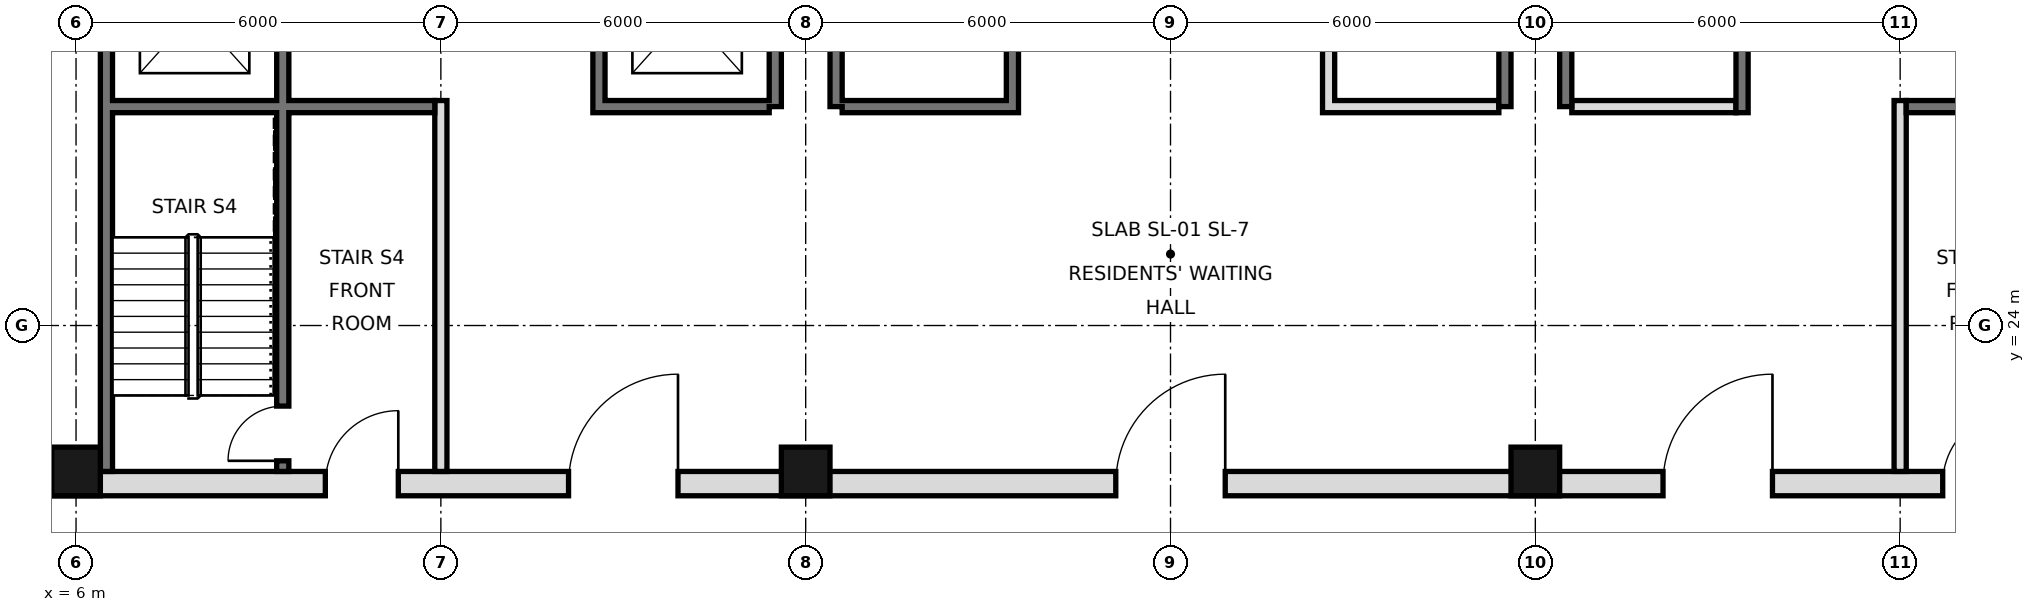
"""IFC4 building model, lengths in metres.
Left out: names, types, materials, properties, quantities, classifications, styles, units other than length and angle.
Written with IfcOpenShell. Run it as: python <this file> out.ifc"""

import sys

from ifc_helpers import new_model, si_unit, direction, frame, frame_2d, origin, origin_2d, place, context, subcontext, project, spatial, rectangle, hollow_rectangle, extrude, element, fill, save


model = new_model("IFC4")
c1 = context("Model", 3, precision=1e-05, world=origin(), true_north=direction((0.0, 1.0)))
c2 = subcontext(c1, "Body", "Model", "MODEL_VIEW")
j1 = project(units=[si_unit("LENGTHUNIT", "METRE"), si_unit("PLANEANGLEUNIT", "RADIAN")], contexts=[c1])
p1 = place(None, origin())
s1 = spatial("IfcSite", under=j1, at=p1, CompositionType="ELEMENT")
p2 = place(p1, origin())
s2 = spatial("IfcBuilding", under=s1, at=p2, CompositionType="ELEMENT")
p3 = place(p2, frame((0.0, 0.0, 75.0)))
s3 = spatial("IfcBuildingStorey", under=s2, at=p3, CompositionType="ELEMENT", Elevation=75.0)
for number, where, z_axis, x_axis in (
    (1, (6.0, 21.6, 0.0), (0.0, 0.0, 1.0), (1.0, 0.0, 0.0)),
    (2, (18.0, 21.6, 0.0), (0.0, 0.0, 1.0), (1.0, 0.0, 0.0)),
    (3, (30.0, 21.6, 0.0), (0.0, 0.0, 1.0), (1.0, 0.0, 0.0)),
):
    element("IfcColumn", number, at=place(p3, frame(where, z_axis=z_axis, x_axis=x_axis)), inside=s3, PredefinedType="COLUMN", context=c2, shape_type="SweptSolid", body=[
        extrude(hollow_rectangle(XDim=0.8, YDim=0.8, WallThickness=0.06, at=origin_2d()), origin(), (0.0, 0.0, 1.0), 3.6),
    ])
p4 = place(p3, frame((6.5, 21.6, 0.0), z_axis=(0.0, 0.0, 1.0), x_axis=(0.0, 1.0, 0.0)))
e4 = element("IfcWall", 4, at=p4, inside=s3, PredefinedType="SOLIDWALL", context=c2, shape_type="SweptSolid", body=[
    extrude(rectangle(XDim=23.5, YDim=0.2, at=frame_2d((11.75, 0.0))), origin(), (0.0, 0.0, 1.0), 3.42),
])
for number, where, z_axis, x_axis in (
    (5, (17.5, 27.6, 0.0), (0.0, 0.0, 1.0), (0.0, 1.0, 0.0)),
    (6, (18.5, 27.6, 0.0), (0.0, 0.0, 1.0), (0.0, 1.0, 0.0)),
    (7, (29.5, 27.6, 0.0), (0.0, 0.0, 1.0), (0.0, 1.0, 0.0)),
    (8, (30.5, 27.6, 0.0), (0.0, 0.0, 1.0), (0.0, 1.0, 0.0)),
):
    element("IfcWall", number, at=place(p3, frame(where, z_axis=z_axis, x_axis=x_axis)), inside=s3, PredefinedType="SOLIDWALL", context=c2, shape_type="SweptSolid", body=[
        extrude(rectangle(XDim=17.5, YDim=0.2, at=frame_2d((8.75, 0.0))), origin(), (0.0, 0.0, 1.0), 3.42),
    ])
p5 = place(p3, frame((5.6, 21.4, 0.0), z_axis=(0.0, 0.0, 1.0), x_axis=(1.0, 0.0, 0.0)))
e9 = element("IfcWall", 9, at=p5, inside=s3, PredefinedType="SOLIDWALL", context=c2, shape_type="SweptSolid", body=[
    extrude(rectangle(XDim=36.8, YDim=0.4, at=frame_2d((18.4, 0.0))), origin(), (0.0, 0.0, 1.0), 3.42),
])
p6 = place(p5, frame((8.5, 0.0, 0.0)))
e10 = element("IfcOpeningElement", 10, at=p6, cuts=e9, PredefinedType="OPENING", context=c2, shape_type="SweptSolid", body=[
    extrude(rectangle(XDim=1.8, YDim=2.1, at=frame_2d((0.9, 1.05))), frame((0.0, 0.21, 0.0), z_axis=(0.0, -1.0, 0.0), x_axis=(1.0, 0.0, 0.0)), (0.0, 0.0, 1.0), 0.42),
])
p7 = place(p5, frame((17.5, 0.0, 0.0)))
e11 = element("IfcOpeningElement", 11, at=p7, cuts=e9, PredefinedType="OPENING", context=c2, shape_type="SweptSolid", body=[
    extrude(rectangle(XDim=1.8, YDim=2.1, at=frame_2d((0.9, 1.05))), frame((0.0, 0.21, 0.0), z_axis=(0.0, -1.0, 0.0), x_axis=(1.0, 0.0, 0.0)), (0.0, 0.0, 1.0), 0.42),
])
p8 = place(p5, frame((26.5, 0.0, 0.0)))
e12 = element("IfcOpeningElement", 12, at=p8, cuts=e9, PredefinedType="OPENING", context=c2, shape_type="SweptSolid", body=[
    extrude(rectangle(XDim=1.8, YDim=2.1, at=frame_2d((0.9, 1.05))), frame((0.0, 0.21, 0.0), z_axis=(0.0, -1.0, 0.0), x_axis=(1.0, 0.0, 0.0)), (0.0, 0.0, 1.0), 0.42),
])
p9 = place(p5, frame((4.5, 0.0, 0.0)))
e13 = element("IfcOpeningElement", 13, at=p9, cuts=e9, PredefinedType="OPENING", context=c2, shape_type="SweptSolid", body=[
    extrude(rectangle(XDim=1.2, YDim=2.1, at=frame_2d((0.6, 1.05))), frame((0.0, 0.21, 0.0), z_axis=(0.0, -1.0, 0.0), x_axis=(1.0, 0.0, 0.0)), (0.0, 0.0, 1.0), 0.42),
])
p10 = place(p5, frame((31.1, 0.0, 0.0)))
e14 = element("IfcOpeningElement", 14, at=p10, cuts=e9, PredefinedType="OPENING", context=c2, shape_type="SweptSolid", body=[
    extrude(rectangle(XDim=1.2, YDim=2.1, at=frame_2d((0.6, 1.05))), frame((0.0, 0.21, 0.0), z_axis=(0.0, -1.0, 0.0), x_axis=(1.0, 0.0, 0.0)), (0.0, 0.0, 1.0), 0.42),
])
p11 = place(p3, frame((12.0, 21.6, 0.0), z_axis=(0.0, 0.0, 1.0), x_axis=(0.0, 1.0, 0.0)))
e15 = element("IfcWall", 15, at=p11, inside=s3, PredefinedType="PARTITIONING", context=c2, shape_type="SweptSolid", body=[
    extrude(rectangle(XDim=6.1, YDim=0.2, at=frame_2d((3.05, 0.0))), origin(), (0.0, 0.0, 1.0), 3.42),
])
p12 = place(p3, frame((14.6, 27.5, 0.0), z_axis=(0.0, 0.0, 1.0), x_axis=(0.0, 1.0, 0.0)))
e16 = element("IfcWall", 16, at=p12, inside=s3, PredefinedType="SOLIDWALL", context=c2, shape_type="SweptSolid", body=[
    extrude(rectangle(XDim=17.5, YDim=0.2, at=frame_2d((8.75, 0.0))), origin(), (0.0, 0.0, 1.0), 3.42),
])
p13 = place(p12, frame((1.1, 0.0, 0.0)))
e17 = element("IfcOpeningElement", 17, at=p13, cuts=e16, PredefinedType="OPENING", context=c2, shape_type="SweptSolid", body=[
    extrude(rectangle(XDim=1.1, YDim=2.1, at=frame_2d((0.55, 1.05))), frame((0.0, 0.11, 0.0), z_axis=(0.0, -1.0, 0.0), x_axis=(1.0, 0.0, 0.0)), (0.0, 0.0, 1.0), 0.22),
])
p14 = place(p12, frame((4.2, 0.0, 0.0)))
e18 = element("IfcOpeningElement", 18, at=p14, cuts=e16, PredefinedType="OPENING", context=c2, shape_type="SweptSolid", body=[
    extrude(rectangle(XDim=1.1, YDim=2.1, at=frame_2d((0.55, 1.05))), frame((0.0, 0.11, 0.0), z_axis=(0.0, -1.0, 0.0), x_axis=(1.0, 0.0, 0.0)), (0.0, 0.0, 1.0), 0.22),
])
p15 = place(p12, frame((15.4, 0.0, 0.0)))
e19 = element("IfcOpeningElement", 19, at=p15, cuts=e16, PredefinedType="OPENING", context=c2, shape_type="SweptSolid", body=[
    extrude(rectangle(XDim=1.1, YDim=2.1, at=frame_2d((0.55, 1.05))), frame((0.0, 0.11, 0.0), z_axis=(0.0, -1.0, 0.0), x_axis=(1.0, 0.0, 0.0)), (0.0, 0.0, 1.0), 0.22),
])
p16 = place(p12, frame((9.9, 0.0, 0.0)))
e20 = element("IfcOpeningElement", 20, at=p16, cuts=e16, PredefinedType="OPENING", context=c2, shape_type="SweptSolid", body=[
    extrude(rectangle(XDim=0.9, YDim=2.1, at=frame_2d((0.45, 1.05))), frame((0.0, 0.11, 0.0), z_axis=(0.0, -1.0, 0.0), x_axis=(1.0, 0.0, 0.0)), (0.0, 0.0, 1.0), 0.22),
])
p17 = place(p3, frame((21.4, 27.5, 0.0), z_axis=(0.0, 0.0, 1.0), x_axis=(0.0, 1.0, 0.0)))
e21 = element("IfcWall", 21, at=p17, inside=s3, PredefinedType="SOLIDWALL", context=c2, shape_type="SweptSolid", body=[
    extrude(rectangle(XDim=17.5, YDim=0.2, at=frame_2d((8.75, 0.0))), origin(), (0.0, 0.0, 1.0), 3.42),
])
p18 = place(p17, frame((9.8, 0.0, 0.0)))
e22 = element("IfcOpeningElement", 22, at=p18, cuts=e21, PredefinedType="OPENING", context=c2, shape_type="SweptSolid", body=[
    extrude(rectangle(XDim=1.0, YDim=2.1, at=frame_2d((0.5, 1.05))), frame((0.0, 0.11, 0.0), z_axis=(0.0, -1.0, 0.0), x_axis=(1.0, 0.0, 0.0)), (0.0, 0.0, 1.0), 0.22),
])
p19 = place(p17, frame((7.4, 0.0, 0.0)))
e23 = element("IfcOpeningElement", 23, at=p19, cuts=e21, PredefinedType="OPENING", context=c2, shape_type="SweptSolid", body=[
    extrude(rectangle(XDim=0.9, YDim=2.1, at=frame_2d((0.45, 1.05))), frame((0.0, 0.11, 0.0), z_axis=(0.0, -1.0, 0.0), x_axis=(1.0, 0.0, 0.0)), (0.0, 0.0, 1.0), 0.22),
])
p20 = place(p3, frame((26.6, 27.5, 0.0), z_axis=(0.0, 0.0, 1.0), x_axis=(0.0, 1.0, 0.0)))
e24 = element("IfcWall", 24, at=p20, inside=s3, PredefinedType="SOLIDWALL", context=c2, shape_type="SweptSolid", body=[
    extrude(rectangle(XDim=17.5, YDim=0.2, at=frame_2d((8.75, 0.0))), origin(), (0.0, 0.0, 1.0), 3.42),
])
p21 = place(p20, frame((4.3, 0.0, 0.0)))
e25 = element("IfcOpeningElement", 25, at=p21, cuts=e24, PredefinedType="OPENING", context=c2, shape_type="SweptSolid", body=[
    extrude(rectangle(XDim=0.9, YDim=2.1, at=frame_2d((0.45, 1.05))), frame((0.0, 0.11, 0.0), z_axis=(0.0, -1.0, 0.0), x_axis=(1.0, 0.0, 0.0)), (0.0, 0.0, 1.0), 0.22),
])
p22 = place(p20, frame((10.35, 0.0, 0.0)))
e26 = element("IfcOpeningElement", 26, at=p22, cuts=e24, PredefinedType="OPENING", context=c2, shape_type="SweptSolid", body=[
    extrude(rectangle(XDim=1.0, YDim=2.1, at=frame_2d((0.5, 1.05))), frame((0.0, 0.11, 0.0), z_axis=(0.0, -1.0, 0.0), x_axis=(1.0, 0.0, 0.0)), (0.0, 0.0, 1.0), 0.22),
])
p23 = place(p20, frame((14.575, 0.0, 0.0)))
e27 = element("IfcOpeningElement", 27, at=p23, cuts=e24, PredefinedType="OPENING", context=c2, shape_type="SweptSolid", body=[
    extrude(rectangle(XDim=1.0, YDim=2.1, at=frame_2d((0.5, 1.05))), frame((0.0, 0.11, 0.0), z_axis=(0.0, -1.0, 0.0), x_axis=(1.0, 0.0, 0.0)), (0.0, 0.0, 1.0), 0.22),
])
p24 = place(p3, frame((33.4, 27.5, 0.0), z_axis=(0.0, 0.0, 1.0), x_axis=(0.0, 1.0, 0.0)))
e28 = element("IfcWall", 28, at=p24, inside=s3, PredefinedType="SOLIDWALL", context=c2, shape_type="SweptSolid", body=[
    extrude(rectangle(XDim=17.5, YDim=0.2, at=frame_2d((8.75, 0.0))), origin(), (0.0, 0.0, 1.0), 3.42),
])
p25 = place(p24, frame((15.4, 0.0, 0.0)))
e29 = element("IfcOpeningElement", 29, at=p25, cuts=e28, PredefinedType="OPENING", context=c2, shape_type="SweptSolid", body=[
    extrude(rectangle(XDim=1.1, YDim=2.1, at=frame_2d((0.55, 1.05))), frame((0.0, 0.11, 0.0), z_axis=(0.0, -1.0, 0.0), x_axis=(1.0, 0.0, 0.0)), (0.0, 0.0, 1.0), 0.22),
])
p26 = place(p24, frame((2.7, 0.0, 0.0)))
e30 = element("IfcOpeningElement", 30, at=p26, cuts=e28, PredefinedType="OPENING", context=c2, shape_type="SweptSolid", body=[
    extrude(rectangle(XDim=1.0, YDim=2.1, at=frame_2d((0.5, 1.05))), frame((0.0, 0.11, 0.0), z_axis=(0.0, -1.0, 0.0), x_axis=(1.0, 0.0, 0.0)), (0.0, 0.0, 1.0), 0.22),
])
p27 = place(p24, frame((9.9, 0.0, 0.0)))
e31 = element("IfcOpeningElement", 31, at=p27, cuts=e28, PredefinedType="OPENING", context=c2, shape_type="SweptSolid", body=[
    extrude(rectangle(XDim=0.9, YDim=2.1, at=frame_2d((0.45, 1.05))), frame((0.0, 0.11, 0.0), z_axis=(0.0, -1.0, 0.0), x_axis=(1.0, 0.0, 0.0)), (0.0, 0.0, 1.0), 0.22),
])
p28 = place(p3, frame((36.0, 21.6, 0.0), z_axis=(0.0, 0.0, 1.0), x_axis=(0.0, 1.0, 0.0)))
e32 = element("IfcWall", 32, at=p28, inside=s3, PredefinedType="PARTITIONING", context=c2, shape_type="SweptSolid", body=[
    extrude(rectangle(XDim=6.1, YDim=0.2, at=frame_2d((3.05, 0.0))), origin(), (0.0, 0.0, 1.0), 3.42),
])
p29 = place(p3, frame((9.4, 21.6, 0.0), z_axis=(0.0, 0.0, 1.0), x_axis=(0.0, 1.0, 0.0)))
e33 = element("IfcWall", 33, at=p29, inside=s3, PredefinedType="SOLIDWALL", context=c2, shape_type="SweptSolid", body=[
    extrude(rectangle(XDim=23.4, YDim=0.2, at=frame_2d((11.7, 0.0))), origin(), (0.0, 0.0, 1.0), 3.42),
])
p30 = place(p29, frame((7.0, 0.0, 0.0)))
e34 = element("IfcOpeningElement", 34, at=p30, cuts=e33, PredefinedType="OPENING", context=c2, shape_type="SweptSolid", body=[
    extrude(rectangle(XDim=1.1, YDim=2.1, at=frame_2d((0.55, 1.05))), frame((0.0, 0.11, 0.0), z_axis=(0.0, -1.0, 0.0), x_axis=(1.0, 0.0, 0.0)), (0.0, 0.0, 1.0), 0.22),
])
p31 = place(p29, frame((10.1, 0.0, 0.0)))
e35 = element("IfcOpeningElement", 35, at=p31, cuts=e33, PredefinedType="OPENING", context=c2, shape_type="SweptSolid", body=[
    extrude(rectangle(XDim=1.1, YDim=2.1, at=frame_2d((0.55, 1.05))), frame((0.0, 0.11, 0.0), z_axis=(0.0, -1.0, 0.0), x_axis=(1.0, 0.0, 0.0)), (0.0, 0.0, 1.0), 0.22),
])
p32 = place(p29, frame((13.2, 0.0, 0.0)))
e36 = element("IfcOpeningElement", 36, at=p32, cuts=e33, PredefinedType="OPENING", context=c2, shape_type="SweptSolid", body=[
    extrude(rectangle(XDim=1.1, YDim=2.1, at=frame_2d((0.55, 1.05))), frame((0.0, 0.11, 0.0), z_axis=(0.0, -1.0, 0.0), x_axis=(1.0, 0.0, 0.0)), (0.0, 0.0, 1.0), 0.22),
])
p33 = place(p29, frame((15.7, 0.0, 0.0)))
e37 = element("IfcOpeningElement", 37, at=p33, cuts=e33, PredefinedType="OPENING", context=c2, shape_type="SweptSolid", body=[
    extrude(rectangle(XDim=1.0, YDim=2.1, at=frame_2d((0.5, 1.05))), frame((0.0, 0.11, 0.0), z_axis=(0.0, -1.0, 0.0), x_axis=(1.0, 0.0, 0.0)), (0.0, 0.0, 1.0), 0.22),
])
p34 = place(p29, frame((0.175, 0.0, 0.0)))
e38 = element("IfcOpeningElement", 38, at=p34, cuts=e33, PredefinedType="OPENING", context=c2, shape_type="SweptSolid", body=[
    extrude(rectangle(XDim=0.9, YDim=2.1, at=frame_2d((0.45, 1.05))), frame((0.0, 0.11, 0.0), z_axis=(0.0, -1.0, 0.0), x_axis=(1.0, 0.0, 0.0)), (0.0, 0.0, 1.0), 0.22),
])
for number, where, z_axis, x_axis in (
    (39, (14.7, 27.6, 0.0), (0.0, 0.0, 1.0), (1.0, 0.0, 0.0)),
    (40, (18.6, 27.6, 0.0), (0.0, 0.0, 1.0), (1.0, 0.0, 0.0)),
    (41, (26.7, 27.6, 0.0), (0.0, 0.0, 1.0), (1.0, 0.0, 0.0)),
):
    element("IfcWall", number, at=place(p3, frame(where, z_axis=z_axis, x_axis=x_axis)), inside=s3, PredefinedType="SOLIDWALL", context=c2, shape_type="SweptSolid", body=[
        extrude(rectangle(XDim=2.7, YDim=0.2, at=frame_2d((1.35, 0.0))), origin(), (0.0, 0.0, 1.0), 3.42),
    ])
p35 = place(p3, frame((30.6, 27.6, 0.0), z_axis=(0.0, 0.0, 1.0), x_axis=(1.0, 0.0, 0.0)))
e42 = element("IfcWall", 42, at=p35, inside=s3, PredefinedType="PARTITIONING", context=c2, shape_type="SweptSolid", body=[
    extrude(rectangle(XDim=2.7, YDim=0.2, at=frame_2d((1.35, 0.0))), origin(), (0.0, 0.0, 1.0), 3.42),
])
for number, where, z_axis, x_axis in (
    (43, (36.1, 27.6, 0.0), (0.0, 0.0, 1.0), (1.0, 0.0, 0.0)),
    (44, (6.6, 27.6, 0.0), (0.0, 0.0, 1.0), (1.0, 0.0, 0.0)),
):
    element("IfcWall", number, at=place(p3, frame(where, z_axis=z_axis, x_axis=x_axis)), inside=s3, PredefinedType="SOLIDWALL", context=c2, shape_type="SweptSolid", body=[
        extrude(rectangle(XDim=5.3, YDim=0.2, at=frame_2d((2.65, 0.0))), origin(), (0.0, 0.0, 1.0), 3.42),
    ])
p36 = place(p6, frame((1.8, 0.0, 0.0), z_axis=(0.0, 0.0, 1.0), x_axis=(-1.0, 0.0, 0.0)))
e45 = element("IfcDoor", 45, at=p36, inside=s3, OperationType="SINGLE_SWING_LEFT", PredefinedType="DOOR", context=c2, shape_type="SweptSolid", body=[
    extrude(rectangle(XDim=1.8, YDim=2.1, at=frame_2d((0.9, 1.05))), frame((0.0, 0.025, 0.0), z_axis=(0.0, -1.0, 0.0), x_axis=(1.0, 0.0, 0.0)), (0.0, 0.0, 1.0), 0.05),
])
fill(e10, e45)
p37 = place(p7, frame((1.8, 0.0, 0.0), z_axis=(0.0, 0.0, 1.0), x_axis=(-1.0, 0.0, 0.0)))
e46 = element("IfcDoor", 46, at=p37, inside=s3, OperationType="SINGLE_SWING_LEFT", PredefinedType="DOOR", context=c2, shape_type="SweptSolid", body=[
    extrude(rectangle(XDim=1.8, YDim=2.1, at=frame_2d((0.9, 1.05))), frame((0.0, 0.025, 0.0), z_axis=(0.0, -1.0, 0.0), x_axis=(1.0, 0.0, 0.0)), (0.0, 0.0, 1.0), 0.05),
])
fill(e11, e46)
p38 = place(p8, frame((1.8, 0.0, 0.0), z_axis=(0.0, 0.0, 1.0), x_axis=(-1.0, 0.0, 0.0)))
e47 = element("IfcDoor", 47, at=p38, inside=s3, OperationType="SINGLE_SWING_LEFT", PredefinedType="DOOR", context=c2, shape_type="SweptSolid", body=[
    extrude(rectangle(XDim=1.8, YDim=2.1, at=frame_2d((0.9, 1.05))), frame((0.0, 0.025, 0.0), z_axis=(0.0, -1.0, 0.0), x_axis=(1.0, 0.0, 0.0)), (0.0, 0.0, 1.0), 0.05),
])
fill(e12, e47)
p39 = place(p9, frame((1.2, 0.0, 0.0), z_axis=(0.0, 0.0, 1.0), x_axis=(-1.0, 0.0, 0.0)))
e48 = element("IfcDoor", 48, at=p39, inside=s3, OperationType="SINGLE_SWING_LEFT", PredefinedType="DOOR", context=c2, shape_type="SweptSolid", body=[
    extrude(rectangle(XDim=1.2, YDim=2.1, at=frame_2d((0.6, 1.05))), frame((0.0, 0.025, 0.0), z_axis=(0.0, -1.0, 0.0), x_axis=(1.0, 0.0, 0.0)), (0.0, 0.0, 1.0), 0.05),
])
fill(e13, e48)
p40 = place(p10, frame((1.2, 0.0, 0.0), z_axis=(0.0, 0.0, 1.0), x_axis=(-1.0, 0.0, 0.0)))
e49 = element("IfcDoor", 49, at=p40, inside=s3, OperationType="SINGLE_SWING_LEFT", PredefinedType="DOOR", context=c2, shape_type="SweptSolid", body=[
    extrude(rectangle(XDim=1.2, YDim=2.1, at=frame_2d((0.6, 1.05))), frame((0.0, 0.025, 0.0), z_axis=(0.0, -1.0, 0.0), x_axis=(1.0, 0.0, 0.0)), (0.0, 0.0, 1.0), 0.05),
])
fill(e14, e49)
p41 = place(p34, origin())
e50 = element("IfcDoor", 50, at=p41, inside=s3, OperationType="SINGLE_SWING_LEFT", PredefinedType="DOOR", context=c2, shape_type="SweptSolid", body=[
    extrude(rectangle(XDim=0.9, YDim=2.1, at=frame_2d((0.45, 1.05))), frame((0.0, 0.025, 0.0), z_axis=(0.0, -1.0, 0.0), x_axis=(1.0, 0.0, 0.0)), (0.0, 0.0, 1.0), 0.05),
])
fill(e38, e50)
save(model, sys.argv[1])
